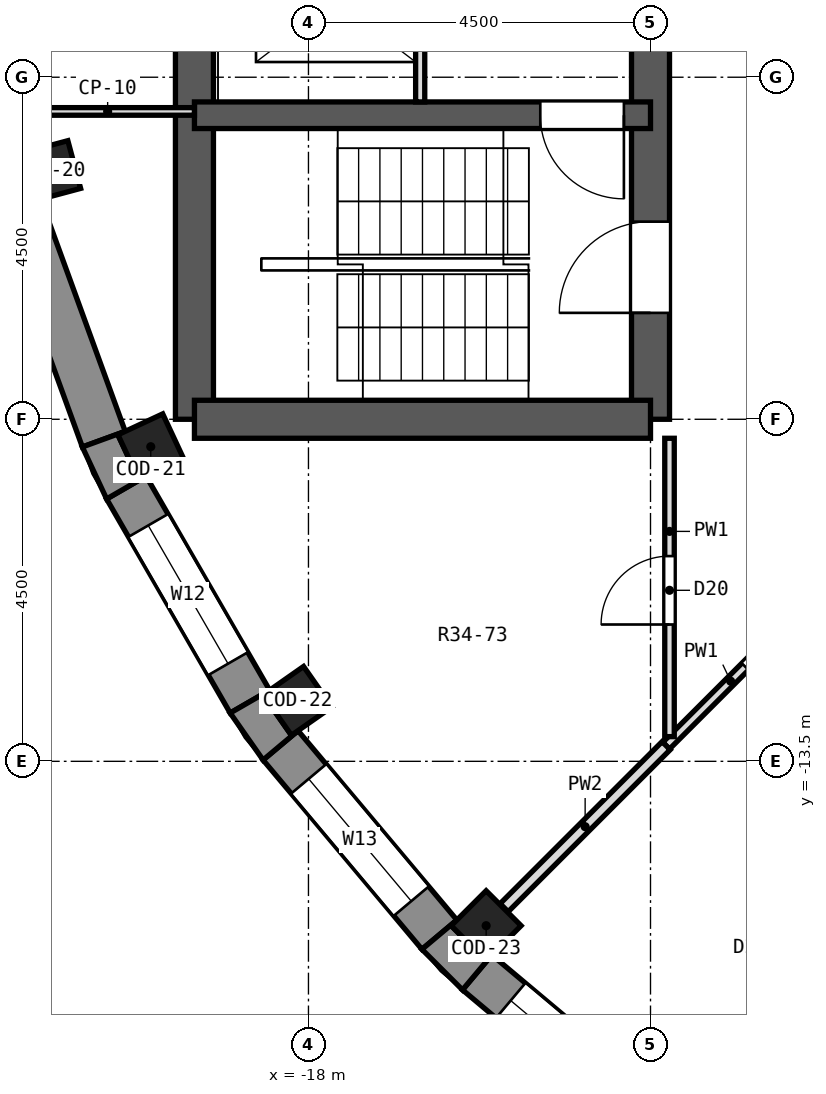
"""IFC4 building model, lengths in metres.
Left out: names, types, materials, properties, quantities, classifications, styles, units other than length and angle.
Written with IfcOpenShell. Run it as: python <this file> out.ifc"""

import sys

from ifc_helpers import new_model, si_unit, direction, frame, frame_2d, origin, origin_2d, place, context, subcontext, project, spatial, polyline, rectangle, outline, extrude, element, fill, save


model = new_model("IFC4")
c1 = context("Model", 3, precision=1e-05, world=origin(), true_north=direction((0.0, 1.0)))
c2 = subcontext(c1, "Body", "Model", "MODEL_VIEW")
j1 = project(units=[si_unit("LENGTHUNIT", "METRE"), si_unit("PLANEANGLEUNIT", "RADIAN")], contexts=[c1])
p1 = place(None, origin())
s1 = spatial("IfcSite", under=j1, at=p1, CompositionType="ELEMENT")
p2 = place(p1, origin())
s2 = spatial("IfcBuilding", under=s1, at=p2, CompositionType="ELEMENT")
p3 = place(p2, frame((0.0, 0.0, 239.6)))
s3 = spatial("IfcBuildingStorey", under=s2, at=p3, CompositionType="ELEMENT", Elevation=239.6)
for number, where, z_axis, x_axis in (
    (1, (-21.395, -5.733, 0.0), (0.0, 0.0, 1.0), (-0.966, -0.259, 0.0)),
    (2, (-20.075, -9.361, 0.0), (0.0, 0.0, 1.0), (-0.906, -0.423, 0.0)),
    (3, (-18.144, -12.705, 0.0), (0.0, 0.0, 1.0), (-0.819, -0.574, 0.0)),
    (4, (-15.662, -15.662, 0.0), (0.0, 0.0, 1.0), (-0.707, -0.707, 0.0)),
):
    element("IfcColumn", number, at=place(p3, frame(where, z_axis=z_axis, x_axis=x_axis)), inside=s3, PredefinedType="COLUMN", context=c2, shape_type="SweptSolid", body=[
        extrude(rectangle(XDim=0.65, YDim=0.65, at=origin_2d()), origin(), (0.0, 0.0, 1.0), 3.3),
    ])
p4 = place(p3, frame((-13.5, -9.0, 0.0), z_axis=(0.0, 0.0, 1.0), x_axis=(0.0, 1.0, 0.0)))
e5 = element("IfcWall", 5, at=p4, inside=s3, PredefinedType="SHEAR", context=c2, shape_type="SweptSolid", body=[
    extrude(rectangle(XDim=18.0, YDim=0.5, at=frame_2d((9.0, 0.0))), origin(), (0.0, 0.0, 1.0), 3.3),
])
p5 = place(p4, frame((15.4, 0.0, 0.0)))
e6 = element("IfcOpeningElement", 6, at=p5, cuts=e5, PredefinedType="OPENING", context=c2, shape_type="SweptSolid", body=[
    extrude(rectangle(XDim=1.2, YDim=2.1, at=frame_2d((0.6, 1.05))), frame((0.0, 0.262, 0.0), z_axis=(0.0, -1.0, 0.0), x_axis=(1.0, 0.0, 0.0)), (0.0, 0.0, 1.0), 0.524),
])
p6 = place(p4, frame((1.4, 0.0, 0.0)))
e7 = element("IfcOpeningElement", 7, at=p6, cuts=e5, PredefinedType="OPENING", context=c2, shape_type="SweptSolid", body=[
    extrude(rectangle(XDim=1.2, YDim=2.1, at=frame_2d((0.6, 1.05))), frame((0.0, 0.262, 0.0), z_axis=(0.0, -1.0, 0.0), x_axis=(1.0, 0.0, 0.0)), (0.0, 0.0, 1.0), 0.524),
])
p7 = place(p4, frame((7.5, 0.0, 0.0)))
e8 = element("IfcOpeningElement", 8, at=p7, cuts=e5, PredefinedType="OPENING", context=c2, shape_type="SweptSolid", body=[
    extrude(rectangle(XDim=3.0, YDim=2.4, at=frame_2d((1.5, 1.2))), frame((0.0, 0.262, 0.0), z_axis=(0.0, -1.0, 0.0), x_axis=(1.0, 0.0, 0.0)), (0.0, 0.0, 1.0), 0.524),
])
p8 = place(p3, frame((-19.5, -9.0, 0.0), z_axis=(0.0, 0.0, 1.0), x_axis=(0.0, 1.0, 0.0)))
e9 = element("IfcWall", 9, at=p8, inside=s3, PredefinedType="SHEAR", context=c2, shape_type="SweptSolid", body=[
    extrude(rectangle(XDim=18.0, YDim=0.5, at=frame_2d((9.0, 0.0))), origin(), (0.0, 0.0, 1.0), 3.3),
])
p9 = place(p8, frame((9.45, 0.0, 0.0)))
e10 = element("IfcOpeningElement", 10, at=p9, cuts=e9, PredefinedType="OPENING", context=c2, shape_type="SweptSolid", body=[
    extrude(rectangle(XDim=0.9, YDim=2.1, at=frame_2d((0.45, 1.05))), frame((0.0, 0.262, 0.0), z_axis=(0.0, -1.0, 0.0), x_axis=(1.0, 0.0, 0.0)), (0.0, 0.0, 1.0), 0.524),
])
p10 = place(p8, frame((7.65, 0.0, 0.0)))
e11 = element("IfcOpeningElement", 11, at=p10, cuts=e9, PredefinedType="OPENING", context=c2, shape_type="SweptSolid", body=[
    extrude(rectangle(XDim=0.9, YDim=2.1, at=frame_2d((0.45, 1.05))), frame((0.0, 0.262, 0.0), z_axis=(0.0, -1.0, 0.0), x_axis=(1.0, 0.0, 0.0)), (0.0, 0.0, 1.0), 0.524),
])
p11 = place(p3, frame((-13.5, -9.0, 0.0), z_axis=(0.0, 0.0, 1.0), x_axis=(-1.0, 0.0, 0.0)))
e12 = element("IfcWall", 12, at=p11, inside=s3, PredefinedType="SHEAR", context=c2, shape_type="SweptSolid", body=[
    extrude(rectangle(XDim=6.0, YDim=0.5, at=frame_2d((3.0, 0.0))), origin(), (0.0, 0.0, 1.0), 3.3),
])
p12 = place(p3, frame((-13.5, -5.0, 0.0), z_axis=(0.0, 0.0, 1.0), x_axis=(-1.0, 0.0, 0.0)))
e13 = element("IfcWall", 13, at=p12, inside=s3, PredefinedType="SHEAR", context=c2, shape_type="SweptSolid", body=[
    extrude(rectangle(XDim=6.0, YDim=0.35, at=frame_2d((3.0, 0.0))), origin(), (0.0, 0.0, 1.0), 3.3),
])
p13 = place(p12, frame((0.35, 0.0, 0.0)))
e14 = element("IfcOpeningElement", 14, at=p13, cuts=e13, PredefinedType="OPENING", context=c2, shape_type="SweptSolid", body=[
    extrude(rectangle(XDim=1.1, YDim=2.1, at=frame_2d((0.55, 1.05))), frame((0.0, 0.187, 0.0), z_axis=(0.0, -1.0, 0.0), x_axis=(1.0, 0.0, 0.0)), (0.0, 0.0, 1.0), 0.374),
])
p14 = place(p3, frame((-21.805, -6.206, 0.0), z_axis=(0.0, 0.0, 1.0), x_axis=(0.342056509473, -0.939679383794, 0.0)))
e15 = element("IfcWall", 15, at=p14, inside=s3, PredefinedType="SOLIDWALL", context=c2, shape_type="SweptSolid", body=[
    extrude(rectangle(XDim=3.252, YDim=0.6, at=frame_2d((1.626, 0.0))), origin(), (0.0, 0.0, 1.0), 2.9),
])
p15 = place(p3, frame((-20.396, -9.898, 0.0), z_axis=(0.0, 0.0, 1.0), x_axis=(0.500014901547, -0.866016800201, 0.0)))
e16 = element("IfcWall", 16, at=p15, inside=s3, PredefinedType="SOLIDWALL", context=c2, shape_type="SweptSolid", body=[
    extrude(rectangle(XDim=3.252, YDim=0.6, at=frame_2d((1.626, 0.0))), origin(), (0.0, 0.0, 1.0), 2.9),
])
p16 = place(p15, frame((0.576, 0.0, 0.9)))
e17 = element("IfcOpeningElement", 17, at=p16, cuts=e16, PredefinedType="OPENING", context=c2, shape_type="SweptSolid", body=[
    extrude(rectangle(XDim=2.1, YDim=1.8, at=frame_2d((1.05, 0.9))), frame((0.0, 0.312, 0.0), z_axis=(0.0, -1.0, 0.0), x_axis=(1.0, 0.0, 0.0)), (0.0, 0.0, 1.0), 0.624),
])
p17 = place(p3, frame((-18.367, -13.29, 0.0), z_axis=(0.0, 0.0, 1.0), x_axis=(0.64277291405, -0.766056773982, 0.0)))
e18 = element("IfcWall", 18, at=p17, inside=s3, PredefinedType="SOLIDWALL", context=c2, shape_type="SweptSolid", body=[
    extrude(rectangle(XDim=3.252, YDim=0.6, at=frame_2d((1.626, 0.0))), origin(), (0.0, 0.0, 1.0), 2.9),
])
p18 = place(p17, frame((0.576, 0.0, 0.9)))
e19 = element("IfcOpeningElement", 19, at=p18, cuts=e18, PredefinedType="OPENING", context=c2, shape_type="SweptSolid", body=[
    extrude(rectangle(XDim=2.1, YDim=1.8, at=frame_2d((1.05, 0.9))), frame((0.0, 0.312, 0.0), z_axis=(0.0, -1.0, 0.0), x_axis=(1.0, 0.0, 0.0)), (0.0, 0.0, 1.0), 0.624),
])
p19 = place(p3, frame((-15.781, -16.277, 0.0), z_axis=(0.0, 0.0, 1.0), x_axis=(0.766056773982, -0.64277291405, 0.0)))
e20 = element("IfcWall", 20, at=p19, inside=s3, PredefinedType="SOLIDWALL", context=c2, shape_type="SweptSolid", body=[
    extrude(rectangle(XDim=3.252, YDim=0.6, at=frame_2d((1.626, 0.0))), origin(), (0.0, 0.0, 1.0), 2.9),
])
p20 = place(p19, frame((0.576, 0.0, 0.9)))
e21 = element("IfcOpeningElement", 21, at=p20, cuts=e20, PredefinedType="OPENING", context=c2, shape_type="SweptSolid", body=[
    extrude(rectangle(XDim=2.1, YDim=1.8, at=frame_2d((1.05, 0.9))), frame((0.0, 0.312, 0.0), z_axis=(0.0, -1.0, 0.0), x_axis=(1.0, 0.0, 0.0)), (0.0, 0.0, 1.0), 0.624),
])
p21 = place(p3, origin())
e22 = element("IfcWall", 22, at=p21, inside=s3, PredefinedType="SOLIDWALL", context=c2, shape_type="SweptSolid", body=[
    extrude(outline(polyline([(-20.975, -9.364), (-20.656, -10.048), (-20.136, -9.748), (-20.232, -9.793), (-20.507, -9.204), (-20.411, -9.159), (-20.975, -9.364)])), origin(), (0.0, 0.0, 1.0), 2.9),
])
p22 = place(p3, origin())
e23 = element("IfcWall", 23, at=p22, inside=s3, PredefinedType="SOLIDWALL", context=c2, shape_type="SweptSolid", body=[
    extrude(outline(polyline([(-19.03, -12.864), (-18.597, -13.482), (-18.137, -13.097), (-18.224, -13.157), (-18.597, -12.625), (-18.51, -12.564), (-19.03, -12.864)])), origin(), (0.0, 0.0, 1.0), 2.9),
])
p23 = place(p3, origin())
e24 = element("IfcWall", 24, at=p23, inside=s3, PredefinedType="SOLIDWALL", context=c2, shape_type="SweptSolid", body=[
    extrude(outline(polyline([(-15.973, -16.507), (-15.588, -16.047), (-15.662, -16.122), (-16.122, -15.662), (-16.047, -15.588), (-16.507, -15.973), (-15.973, -16.507)])), origin(), (0.0, 0.0, 1.0), 2.9),
])
p24 = place(p3, frame((-13.294, -13.294, 0.0), z_axis=(0.0, 0.0, 1.0), x_axis=(0.707106781187, 0.707106781187, 0.0)))
e25 = element("IfcWall", 25, at=p24, inside=s3, PredefinedType="PARTITIONING", context=c2, shape_type="SweptSolid", body=[
    extrude(rectangle(XDim=3.717, YDim=0.125, at=frame_2d((1.858, 0.0))), origin(), (0.0, 0.0, 1.0), 2.9),
])
p25 = place(p24, frame((1.471, 0.0, 0.0)))
e26 = element("IfcOpeningElement", 26, at=p25, cuts=e25, PredefinedType="OPENING", context=c2, shape_type="SweptSolid", body=[
    extrude(rectangle(XDim=0.9, YDim=2.1, at=frame_2d((0.45, 1.05))), frame((0.0, 0.074, 0.0), z_axis=(0.0, -1.0, 0.0), x_axis=(1.0, 0.0, 0.0)), (0.0, 0.0, 1.0), 0.149),
])
p26 = place(p3, frame((-15.426, -15.426, 0.0), z_axis=(0.0, 0.0, 1.0), x_axis=(0.707106781187, 0.707106781187, 0.0)))
e27 = element("IfcWall", 27, at=p26, inside=s3, PredefinedType="PARTITIONING", context=c2, shape_type="SweptSolid", body=[
    extrude(rectangle(XDim=3.014, YDim=0.15, at=frame_2d((1.507, 0.0))), origin(), (0.0, 0.0, 1.0), 2.9),
])
p27 = place(p3, frame((-12.513, -17.87, 0.0), z_axis=(0.0, 0.0, 1.0), x_axis=(0.573384599987, 0.819286336086, 0.0)))
e28 = element("IfcWall", 28, at=p27, inside=s3, PredefinedType="PARTITIONING", context=c2, shape_type="SweptSolid", body=[
    extrude(rectangle(XDim=1.475, YDim=0.125, at=frame_2d((0.738, 0.0))), origin(), (0.0, 0.0, 1.0), 2.9),
])
p28 = place(p27, frame((0.123, 0.0, 0.0)))
e29 = element("IfcOpeningElement", 29, at=p28, cuts=e28, PredefinedType="OPENING", context=c2, shape_type="SweptSolid", body=[
    extrude(rectangle(XDim=0.9, YDim=2.1, at=frame_2d((0.45, 1.05))), frame((0.0, 0.074, 0.0), z_axis=(0.0, -1.0, 0.0), x_axis=(1.0, 0.0, 0.0)), (0.0, 0.0, 1.0), 0.149),
])
p29 = place(p3, frame((-13.25, -13.175, 0.0), z_axis=(0.0, 0.0, 1.0), x_axis=(0.0, 1.0, 0.0)))
e30 = element("IfcWall", 30, at=p29, inside=s3, PredefinedType="PARTITIONING", context=c2, shape_type="SweptSolid", body=[
    extrude(rectangle(XDim=3.925, YDim=0.125, at=frame_2d((1.962, 0.0))), origin(), (0.0, 0.0, 1.0), 2.9),
])
p30 = place(p29, frame((1.475, 0.0, 0.0)))
e31 = element("IfcOpeningElement", 31, at=p30, cuts=e30, PredefinedType="OPENING", context=c2, shape_type="SweptSolid", body=[
    extrude(rectangle(XDim=0.9, YDim=2.1, at=frame_2d((0.45, 1.05))), frame((0.0, 0.074, 0.0), z_axis=(0.0, -1.0, 0.0), x_axis=(1.0, 0.0, 0.0)), (0.0, 0.0, 1.0), 0.149),
])
p31 = place(p3, frame((-19.5, -4.95, 0.0), z_axis=(0.0, 0.0, 1.0), x_axis=(-1.0, 0.0, 0.0)))
e32 = element("IfcWall", 32, at=p31, inside=s3, PredefinedType="PARTITIONING", context=c2, shape_type="SweptSolid", body=[
    extrude(rectangle(XDim=2.284, YDim=0.1, at=frame_2d((1.142, 0.0))), origin(), (0.0, 0.0, 1.0), 2.9),
])
p32 = place(p3, frame((-16.53, -4.825, 0.0), z_axis=(0.0, 0.0, 1.0), x_axis=(0.0, 1.0, 0.0)))
e33 = element("IfcWall", 33, at=p32, inside=s3, PredefinedType="PARTITIONING", context=c2, shape_type="SweptSolid", body=[
    extrude(rectangle(XDim=2.65, YDim=0.12, at=frame_2d((1.325, 0.0))), origin(), (0.0, 0.0, 1.0), 2.9),
])
p33 = place(p32, frame((0.775, 0.0, 0.0)))
e34 = element("IfcOpeningElement", 34, at=p33, cuts=e33, PredefinedType="OPENING", context=c2, shape_type="SweptSolid", body=[
    extrude(rectangle(XDim=1.1, YDim=2.1, at=frame_2d((0.55, 1.05))), frame((0.0, 0.072, 0.0), z_axis=(0.0, -1.0, 0.0), x_axis=(1.0, 0.0, 0.0)), (0.0, 0.0, 1.0), 0.144),
])
p34 = place(p16, origin())
e35 = element("IfcWindow", 35, at=p34, inside=s3, PartitioningType="SINGLE_PANEL", PredefinedType="WINDOW", context=c2, shape_type="SweptSolid", body=[
    extrude(rectangle(XDim=2.1, YDim=1.8, at=frame_2d((1.05, 0.9))), frame((0.0, 0.18, 0.0), z_axis=(0.0, -1.0, 0.0), x_axis=(1.0, 0.0, 0.0)), (0.0, 0.0, 1.0), 0.06),
])
fill(e17, e35)
p35 = place(p18, origin())
e36 = element("IfcWindow", 36, at=p35, inside=s3, PartitioningType="SINGLE_PANEL", PredefinedType="WINDOW", context=c2, shape_type="SweptSolid", body=[
    extrude(rectangle(XDim=2.1, YDim=1.8, at=frame_2d((1.05, 0.9))), frame((0.0, 0.18, 0.0), z_axis=(0.0, -1.0, 0.0), x_axis=(1.0, 0.0, 0.0)), (0.0, 0.0, 1.0), 0.06),
])
fill(e19, e36)
p36 = place(p20, origin())
e37 = element("IfcWindow", 37, at=p36, inside=s3, PartitioningType="SINGLE_PANEL", PredefinedType="WINDOW", context=c2, shape_type="SweptSolid", body=[
    extrude(rectangle(XDim=2.1, YDim=1.8, at=frame_2d((1.05, 0.9))), frame((0.0, 0.18, 0.0), z_axis=(0.0, -1.0, 0.0), x_axis=(1.0, 0.0, 0.0)), (0.0, 0.0, 1.0), 0.06),
])
fill(e21, e37)
p37 = place(p30, origin())
e38 = element("IfcDoor", 38, at=p37, inside=s3, OperationType="SINGLE_SWING_LEFT", PredefinedType="DOOR", context=c2, shape_type="SweptSolid", body=[
    extrude(rectangle(XDim=0.9, YDim=2.1, at=frame_2d((0.45, 1.05))), frame((0.0, 0.025, 0.0), z_axis=(0.0, -1.0, 0.0), x_axis=(1.0, 0.0, 0.0)), (0.0, 0.0, 1.0), 0.05),
])
fill(e31, e38)
p38 = place(p25, frame((0.9, 0.0, 0.0), z_axis=(0.0, 0.0, 1.0), x_axis=(-1.0, 0.0, 0.0)))
e39 = element("IfcDoor", 39, at=p38, inside=s3, OperationType="SINGLE_SWING_LEFT", PredefinedType="DOOR", context=c2, shape_type="SweptSolid", body=[
    extrude(rectangle(XDim=0.9, YDim=2.1, at=frame_2d((0.45, 1.05))), frame((0.0, 0.025, 0.0), z_axis=(0.0, -1.0, 0.0), x_axis=(1.0, 0.0, 0.0)), (0.0, 0.0, 1.0), 0.05),
])
fill(e26, e39)
p39 = place(p13, origin())
e40 = element("IfcDoor", 40, at=p39, inside=s3, OperationType="SINGLE_SWING_LEFT", PredefinedType="DOOR", context=c2, shape_type="SweptSolid", body=[
    extrude(rectangle(XDim=1.1, YDim=2.1, at=frame_2d((0.55, 1.05))), frame((0.0, 0.025, 0.0), z_axis=(0.0, -1.0, 0.0), x_axis=(1.0, 0.0, 0.0)), (0.0, 0.0, 1.0), 0.05),
])
fill(e14, e40)
p40 = place(p6, origin())
e41 = element("IfcDoor", 41, at=p40, inside=s3, OperationType="SINGLE_SWING_LEFT", PredefinedType="DOOR", context=c2, shape_type="SweptSolid", body=[
    extrude(rectangle(XDim=1.2, YDim=2.1, at=frame_2d((0.6, 1.05))), frame((0.0, 0.025, 0.0), z_axis=(0.0, -1.0, 0.0), x_axis=(1.0, 0.0, 0.0)), (0.0, 0.0, 1.0), 0.05),
])
fill(e7, e41)
save(model, sys.argv[1])
